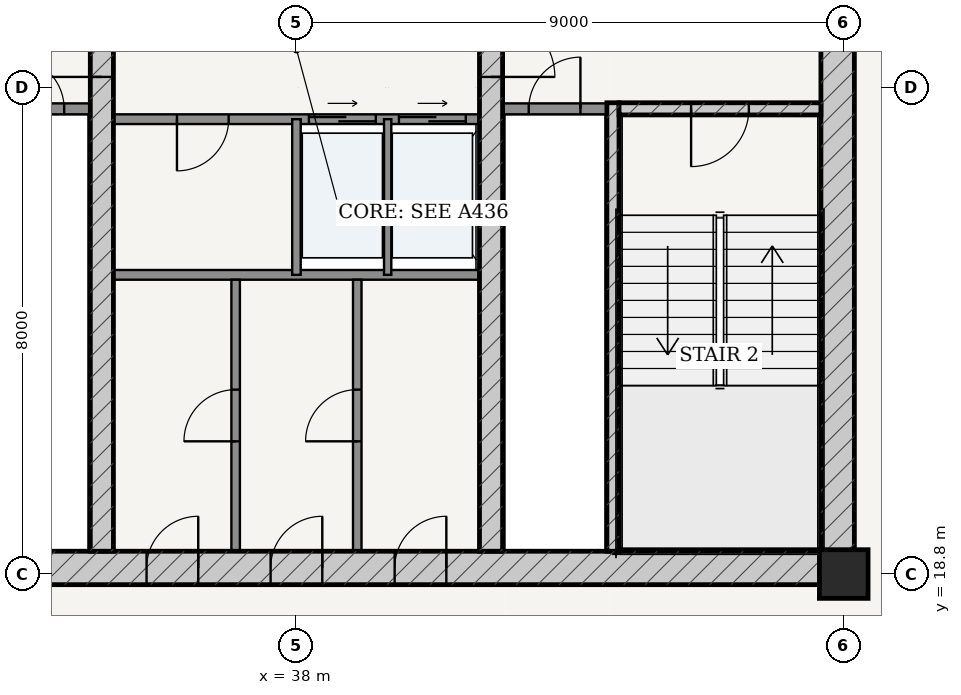
"""IFC4 building model, lengths in metres.
Left out: names, types, materials, properties, quantities, classifications, styles, units other than length and angle.
Written with IfcOpenShell. Run it as: python <this file> out.ifc"""

import sys

from ifc_helpers import new_model, si_unit, direction, frame, frame_2d, origin, origin_2d, place, context, subcontext, project, spatial, rectangle, extrude, source, transform, mapped, element, fill, save


model = new_model("IFC4")
c1 = context("Model", 3, precision=1e-05, world=origin(), true_north=direction((-0.2419218956, 0.970295726276)))
c2 = subcontext(c1, "Body", "Model", "MODEL_VIEW")
j1 = project(units=[si_unit("LENGTHUNIT", "METRE"), si_unit("PLANEANGLEUNIT", "RADIAN")], contexts=[c1])
p1 = place(None, origin())
s1 = spatial("IfcSite", under=j1, at=p1, CompositionType="ELEMENT")
p2 = place(p1, origin())
s2 = spatial("IfcBuilding", under=s1, at=p2, CompositionType="ELEMENT")
p3 = place(p2, frame((0.0, 0.0, 278.2)))
s3 = spatial("IfcBuildingStorey", under=s2, at=p3, CompositionType="ELEMENT", Elevation=278.2)
p4 = place(p3, frame((47.0, 18.8, 0.0), z_axis=(0.0, 0.0, 1.0), x_axis=(1.0, 0.0, 0.0)))
e1 = element("IfcColumn", 1, at=p4, inside=s3, PredefinedType="COLUMN", context=c2, shape_type="SweptSolid", body=[
    extrude(rectangle(XDim=0.8, YDim=0.8, at=origin_2d()), origin(), (0.0, 0.0, 1.0), 3.75),
])
p5 = place(p3, frame((28.825, 18.9, 0.0), z_axis=(0.0, 0.0, 1.0), x_axis=(1.0, 0.0, 0.0)))
e2 = element("IfcWall", 2, at=p5, inside=s3, PredefinedType="SHEAR", context=c2, shape_type="SweptSolid", body=[
    extrude(rectangle(XDim=18.35, YDim=0.55, at=frame_2d((9.175, 0.0))), origin(), (0.0, 0.0, 1.0), 3.49),
])
p6 = place(p5, frame((6.71, 0.0, 0.0)))
e3 = element("IfcOpeningElement", 3, at=p6, cuts=e2, PredefinedType="OPENING", context=c2, shape_type="SweptSolid", body=[
    extrude(rectangle(XDim=0.85, YDim=2.1, at=frame_2d((0.425, 1.05))), frame((0.0, 0.285, 0.0), z_axis=(0.0, -1.0, 0.0), x_axis=(1.0, 0.0, 0.0)), (0.0, 0.0, 1.0), 0.57),
])
p7 = place(p5, frame((8.75, 0.0, 0.0)))
e4 = element("IfcOpeningElement", 4, at=p7, cuts=e2, PredefinedType="OPENING", context=c2, shape_type="SweptSolid", body=[
    extrude(rectangle(XDim=0.85, YDim=2.1, at=frame_2d((0.425, 1.05))), frame((0.0, 0.285, 0.0), z_axis=(0.0, -1.0, 0.0), x_axis=(1.0, 0.0, 0.0)), (0.0, 0.0, 1.0), 0.57),
])
p8 = place(p5, frame((10.79, 0.0, 0.0)))
e5 = element("IfcOpeningElement", 5, at=p8, cuts=e2, PredefinedType="OPENING", context=c2, shape_type="SweptSolid", body=[
    extrude(rectangle(XDim=0.85, YDim=2.1, at=frame_2d((0.425, 1.05))), frame((0.0, 0.285, 0.0), z_axis=(0.0, -1.0, 0.0), x_axis=(1.0, 0.0, 0.0)), (0.0, 0.0, 1.0), 0.57),
])
p9 = place(p3, frame((46.9, 19.175, 0.0), z_axis=(0.0, 0.0, 1.0), x_axis=(0.0, 1.0, 0.0)))
e6 = element("IfcWall", 6, at=p9, inside=s3, PredefinedType="SHEAR", context=c2, shape_type="SweptSolid", body=[
    extrude(rectangle(XDim=15.25, YDim=0.55, at=frame_2d((7.625, 0.0))), origin(), (0.0, 0.0, 1.0), 3.49),
])
p10 = place(p9, frame((9.875, 0.0, 0.0)))
e7 = element("IfcOpeningElement", 7, at=p10, cuts=e6, PredefinedType="OPENING", context=c2, shape_type="SweptSolid", body=[
    extrude(rectangle(XDim=1.5, YDim=2.2, at=frame_2d((0.75, 1.1))), frame((0.0, 0.285, 0.0), z_axis=(0.0, -1.0, 0.0), x_axis=(1.0, 0.0, 0.0)), (0.0, 0.0, 1.0), 0.57),
])
p11 = place(p3, frame((43.205, 19.175, 0.0), z_axis=(0.0, 0.0, 1.0), x_axis=(0.0, 1.0, 0.0)))
e8 = element("IfcWall", 8, at=p11, inside=s3, PredefinedType="SOLIDWALL", context=c2, shape_type="SweptSolid", body=[
    extrude(rectangle(XDim=7.375, YDim=0.2, at=frame_2d((3.688, 0.0))), origin(), (0.0, 0.0, 1.0), 3.49),
])
p12 = place(p3, frame((43.305, 26.45, 0.0), z_axis=(0.0, 0.0, 1.0), x_axis=(1.0, 0.0, 0.0)))
e9 = element("IfcWall", 9, at=p12, inside=s3, PredefinedType="SOLIDWALL", context=c2, shape_type="SweptSolid", body=[
    extrude(rectangle(XDim=3.32, YDim=0.2, at=frame_2d((1.66, 0.0))), origin(), (0.0, 0.0, 1.0), 3.49),
])
p13 = place(p12, frame((1.185, 0.0, 0.0)))
e10 = element("IfcOpeningElement", 10, at=p13, cuts=e9, PredefinedType="OPENING", context=c2, shape_type="SweptSolid", body=[
    extrude(rectangle(XDim=0.95, YDim=2.15, at=frame_2d((0.475, 1.075))), frame((0.0, 0.11, 0.0), z_axis=(0.0, -1.0, 0.0), x_axis=(1.0, 0.0, 0.0)), (0.0, 0.0, 1.0), 0.22),
])
p14 = place(p3, frame((34.8, 19.175, 0.0), z_axis=(0.0, 0.0, 1.0), x_axis=(0.0, 1.0, 0.0)))
e11 = element("IfcWall", 11, at=p14, inside=s3, PredefinedType="SHEAR", context=c2, shape_type="SweptSolid", body=[
    extrude(rectangle(XDim=15.25, YDim=0.38, at=frame_2d((7.625, 0.0))), origin(), (0.0, 0.0, 1.0), 3.49),
])
p15 = place(p14, frame((7.8, 0.0, 0.0)))
e12 = element("IfcOpeningElement", 12, at=p15, cuts=e11, PredefinedType="OPENING", context=c2, shape_type="SweptSolid", body=[
    extrude(rectangle(XDim=1.05, YDim=2.15, at=frame_2d((0.525, 1.075))), frame((0.0, 0.2, 0.0), z_axis=(0.0, -1.0, 0.0), x_axis=(1.0, 0.0, 0.0)), (0.0, 0.0, 1.0), 0.4),
])
p16 = place(p3, frame((41.2, 19.175, 0.0), z_axis=(0.0, 0.0, 1.0), x_axis=(0.0, 1.0, 0.0)))
e13 = element("IfcWall", 13, at=p16, inside=s3, PredefinedType="SHEAR", context=c2, shape_type="SweptSolid", body=[
    extrude(rectangle(XDim=15.25, YDim=0.38, at=frame_2d((7.625, 0.0))), origin(), (0.0, 0.0, 1.0), 3.49),
])
p17 = place(p16, frame((7.8, 0.0, 0.0)))
e14 = element("IfcOpeningElement", 14, at=p17, cuts=e13, PredefinedType="OPENING", context=c2, shape_type="SweptSolid", body=[
    extrude(rectangle(XDim=1.05, YDim=2.15, at=frame_2d((0.525, 1.075))), frame((0.0, 0.2, 0.0), z_axis=(0.0, -1.0, 0.0), x_axis=(1.0, 0.0, 0.0)), (0.0, 0.0, 1.0), 0.4),
])
p18 = place(p3, frame((32.9, 26.45, 0.0), z_axis=(0.0, 0.0, 1.0), x_axis=(1.0, 0.0, 0.0)))
e15 = element("IfcWall", 15, at=p18, inside=s3, PredefinedType="PARTITIONING", context=c2, shape_type="SweptSolid", body=[
    extrude(rectangle(XDim=1.71, YDim=0.18, at=frame_2d((0.855, 0.0))), origin(), (0.0, 0.0, 1.0), 3.49),
])
p19 = place(p18, frame((0.43, 0.0, 0.0)))
e16 = element("IfcOpeningElement", 16, at=p19, cuts=e15, PredefinedType="OPENING", context=c2, shape_type="SweptSolid", body=[
    extrude(rectangle(XDim=0.85, YDim=2.1, at=frame_2d((0.425, 1.05))), frame((0.0, 0.1, 0.0), z_axis=(0.0, -1.0, 0.0), x_axis=(1.0, 0.0, 0.0)), (0.0, 0.0, 1.0), 0.2),
])
p20 = place(p3, frame((41.39, 26.45, 0.0), z_axis=(0.0, 0.0, 1.0), x_axis=(1.0, 0.0, 0.0)))
e17 = element("IfcWall", 17, at=p20, inside=s3, PredefinedType="PARTITIONING", context=c2, shape_type="SweptSolid", body=[
    extrude(rectangle(XDim=1.71, YDim=0.18, at=frame_2d((0.855, 0.0))), origin(), (0.0, 0.0, 1.0), 3.49),
])
p21 = place(p20, frame((0.43, 0.0, 0.0)))
e18 = element("IfcOpeningElement", 18, at=p21, cuts=e17, PredefinedType="OPENING", context=c2, shape_type="SweptSolid", body=[
    extrude(rectangle(XDim=0.85, YDim=2.1, at=frame_2d((0.425, 1.05))), frame((0.0, 0.1, 0.0), z_axis=(0.0, -1.0, 0.0), x_axis=(1.0, 0.0, 0.0)), (0.0, 0.0, 1.0), 0.2),
])
p22 = place(p3, frame((34.99, 26.28, 0.0), z_axis=(0.0, 0.0, 1.0), x_axis=(1.0, 0.0, 0.0)))
e19 = element("IfcWall", 19, at=p22, inside=s3, PredefinedType="PARTITIONING", context=c2, shape_type="SweptSolid", body=[
    extrude(rectangle(XDim=6.02, YDim=0.16, at=frame_2d((3.01, 0.0))), origin(), (0.0, 0.0, 1.0), 3.49),
])
p23 = place(p22, frame((1.045, 0.0, 0.0)))
e20 = element("IfcOpeningElement", 20, at=p23, cuts=e19, PredefinedType="OPENING", context=c2, shape_type="SweptSolid", body=[
    extrude(rectangle(XDim=0.85, YDim=2.1, at=frame_2d((0.425, 1.05))), frame((0.0, 0.09, 0.0), z_axis=(0.0, -1.0, 0.0), x_axis=(1.0, 0.0, 0.0)), (0.0, 0.0, 1.0), 0.18),
])
p24 = place(p22, frame((3.215, 0.0, 0.0)))
e21 = element("IfcOpeningElement", 21, at=p24, cuts=e19, PredefinedType="OPENING", context=c2, shape_type="SweptSolid", body=[
    extrude(rectangle(XDim=1.1, YDim=2.2, at=frame_2d((0.55, 1.1))), frame((0.0, 0.09, 0.0), z_axis=(0.0, -1.0, 0.0), x_axis=(1.0, 0.0, 0.0)), (0.0, 0.0, 1.0), 0.18),
])
p25 = place(p22, frame((4.695, 0.0, 0.0)))
e22 = element("IfcOpeningElement", 22, at=p25, cuts=e19, PredefinedType="OPENING", context=c2, shape_type="SweptSolid", body=[
    extrude(rectangle(XDim=1.1, YDim=2.2, at=frame_2d((0.55, 1.1))), frame((0.0, 0.09, 0.0), z_axis=(0.0, -1.0, 0.0), x_axis=(1.0, 0.0, 0.0)), (0.0, 0.0, 1.0), 0.18),
])
p26 = place(p3, frame((34.99, 23.72, 0.0), z_axis=(0.0, 0.0, 1.0), x_axis=(1.0, 0.0, 0.0)))
e23 = element("IfcWall", 23, at=p26, inside=s3, PredefinedType="PARTITIONING", context=c2, shape_type="SweptSolid", body=[
    extrude(rectangle(XDim=6.02, YDim=0.16, at=frame_2d((3.01, 0.0))), origin(), (0.0, 0.0, 1.0), 3.49),
])
p27 = place(p3, frame((38.0, 23.72, 0.0), z_axis=(0.0, 0.0, 1.0), x_axis=(0.0, 1.0, 0.0)))
e24 = element("IfcWall", 24, at=p27, inside=s3, PredefinedType="PARTITIONING", context=c2, shape_type="SweptSolid", body=[
    extrude(rectangle(XDim=2.56, YDim=0.14, at=frame_2d((1.28, 0.0))), origin(), (0.0, 0.0, 1.0), 3.49),
])
p28 = place(p3, frame((39.5, 23.72, 0.0), z_axis=(0.0, 0.0, 1.0), x_axis=(0.0, 1.0, 0.0)))
e25 = element("IfcWall", 25, at=p28, inside=s3, PredefinedType="PARTITIONING", context=c2, shape_type="SweptSolid", body=[
    extrude(rectangle(XDim=2.56, YDim=0.12, at=frame_2d((1.28, 0.0))), origin(), (0.0, 0.0, 1.0), 3.49),
])
p29 = place(p3, frame((37.0, 19.175, 0.0), z_axis=(0.0, 0.0, 1.0), x_axis=(0.0, 1.0, 0.0)))
e26 = element("IfcWall", 26, at=p29, inside=s3, PredefinedType="PARTITIONING", context=c2, shape_type="SweptSolid", body=[
    extrude(rectangle(XDim=4.465, YDim=0.14, at=frame_2d((2.232, 0.0))), origin(), (0.0, 0.0, 1.0), 3.49),
])
p30 = place(p29, frame((1.808, 0.0, 0.0)))
e27 = element("IfcOpeningElement", 27, at=p30, cuts=e26, PredefinedType="OPENING", context=c2, shape_type="SweptSolid", body=[
    extrude(rectangle(XDim=0.85, YDim=2.1, at=frame_2d((0.425, 1.05))), frame((0.0, 0.08, 0.0), z_axis=(0.0, -1.0, 0.0), x_axis=(1.0, 0.0, 0.0)), (0.0, 0.0, 1.0), 0.16),
])
p31 = place(p3, frame((39.0, 19.175, 0.0), z_axis=(0.0, 0.0, 1.0), x_axis=(0.0, 1.0, 0.0)))
e28 = element("IfcWall", 28, at=p31, inside=s3, PredefinedType="PARTITIONING", context=c2, shape_type="SweptSolid", body=[
    extrude(rectangle(XDim=4.465, YDim=0.14, at=frame_2d((2.232, 0.0))), origin(), (0.0, 0.0, 1.0), 3.49),
])
p32 = place(p31, frame((1.808, 0.0, 0.0)))
e29 = element("IfcOpeningElement", 29, at=p32, cuts=e28, PredefinedType="OPENING", context=c2, shape_type="SweptSolid", body=[
    extrude(rectangle(XDim=0.85, YDim=2.1, at=frame_2d((0.425, 1.05))), frame((0.0, 0.08, 0.0), z_axis=(0.0, -1.0, 0.0), x_axis=(1.0, 0.0, 0.0)), (0.0, 0.0, 1.0), 0.16),
])
m1 = source(origin(), c2, "Body", "SweptSolid", [
    extrude(rectangle(XDim=1.05, YDim=2.15, at=frame_2d((0.525, 1.075))), frame((0.0, 0.025, 0.0), z_axis=(0.0, -1.0, 0.0), x_axis=(1.0, 0.0, 0.0)), (0.0, 0.0, 1.0), 0.05),
])
p33 = place(p15, origin())
e30 = element("IfcDoor", 30, at=p33, inside=s3, OperationType="SINGLE_SWING_LEFT", PredefinedType="DOOR", context=c2, shape_type="MappedRepresentation", body=[
    mapped(m1, transform((0.0, 0.0, 0.0), scale=1.0)),
])
fill(e12, e30)
p34 = place(p17, frame((1.05, 0.0, 0.0), z_axis=(0.0, 0.0, 1.0), x_axis=(-1.0, 0.0, 0.0)))
e31 = element("IfcDoor", 31, at=p34, inside=s3, OperationType="SINGLE_SWING_RIGHT", PredefinedType="DOOR", context=c2, shape_type="MappedRepresentation", body=[
    mapped(m1, transform((0.0, 0.0, 0.0), scale=1.0)),
])
fill(e14, e31)
m2 = source(origin(), c2, "Body", "SweptSolid", [
    extrude(rectangle(XDim=0.95, YDim=2.15, at=frame_2d((0.475, 1.075))), frame((0.0, 0.025, 0.0), z_axis=(0.0, -1.0, 0.0), x_axis=(1.0, 0.0, 0.0)), (0.0, 0.0, 1.0), 0.05),
])
p35 = place(p13, frame((0.95, 0.0, 0.0), z_axis=(0.0, 0.0, 1.0), x_axis=(-1.0, 0.0, 0.0)))
e32 = element("IfcDoor", 32, at=p35, inside=s3, OperationType="SINGLE_SWING_RIGHT", PredefinedType="DOOR", context=c2, shape_type="MappedRepresentation", body=[
    mapped(m2, transform((0.0, 0.0, 0.0), scale=1.0)),
])
fill(e10, e32)
m3 = source(origin(), c2, "Body", "SweptSolid", [
    extrude(rectangle(XDim=0.85, YDim=2.1, at=frame_2d((0.425, 1.05))), frame((0.0, 0.025, 0.0), z_axis=(0.0, -1.0, 0.0), x_axis=(1.0, 0.0, 0.0)), (0.0, 0.0, 1.0), 0.05),
])
p36 = place(p19, origin())
e33 = element("IfcDoor", 33, at=p36, inside=s3, OperationType="SINGLE_SWING_LEFT", PredefinedType="DOOR", context=c2, shape_type="MappedRepresentation", body=[
    mapped(m3, transform((0.0, 0.0, 0.0), scale=1.0)),
])
fill(e16, e33)
p37 = place(p21, origin())
e34 = element("IfcDoor", 34, at=p37, inside=s3, OperationType="SINGLE_SWING_RIGHT", PredefinedType="DOOR", context=c2, shape_type="MappedRepresentation", body=[
    mapped(m3, transform((0.0, 0.0, 0.0), scale=1.0)),
])
fill(e18, e34)
p38 = place(p23, frame((0.85, 0.0, 0.0), z_axis=(0.0, 0.0, 1.0), x_axis=(-1.0, 0.0, 0.0)))
e35 = element("IfcDoor", 35, at=p38, inside=s3, OperationType="SINGLE_SWING_RIGHT", PredefinedType="DOOR", context=c2, shape_type="MappedRepresentation", body=[
    mapped(m3, transform((0.0, 0.0, 0.0), scale=1.0)),
])
fill(e20, e35)
p39 = place(p6, origin())
e36 = element("IfcDoor", 36, at=p39, inside=s3, OperationType="SINGLE_SWING_RIGHT", PredefinedType="DOOR", context=c2, shape_type="MappedRepresentation", body=[
    mapped(m3, transform((0.0, 0.0, 0.0), scale=1.0)),
])
fill(e3, e36)
p40 = place(p7, origin())
e37 = element("IfcDoor", 37, at=p40, inside=s3, OperationType="SINGLE_SWING_RIGHT", PredefinedType="DOOR", context=c2, shape_type="MappedRepresentation", body=[
    mapped(m3, transform((0.0, 0.0, 0.0), scale=1.0)),
])
fill(e4, e37)
p41 = place(p8, origin())
e38 = element("IfcDoor", 38, at=p41, inside=s3, OperationType="SINGLE_SWING_RIGHT", PredefinedType="DOOR", context=c2, shape_type="MappedRepresentation", body=[
    mapped(m3, transform((0.0, 0.0, 0.0), scale=1.0)),
])
fill(e5, e38)
p42 = place(p30, origin())
e39 = element("IfcDoor", 39, at=p42, inside=s3, OperationType="SINGLE_SWING_LEFT", PredefinedType="DOOR", context=c2, shape_type="MappedRepresentation", body=[
    mapped(m3, transform((0.0, 0.0, 0.0), scale=1.0)),
])
fill(e27, e39)
p43 = place(p32, origin())
e40 = element("IfcDoor", 40, at=p43, inside=s3, OperationType="SINGLE_SWING_LEFT", PredefinedType="DOOR", context=c2, shape_type="MappedRepresentation", body=[
    mapped(m3, transform((0.0, 0.0, 0.0), scale=1.0)),
])
fill(e29, e40)
m4 = source(origin(), c2, "Body", "SweptSolid", [
    extrude(rectangle(XDim=1.1, YDim=2.2, at=frame_2d((0.55, 1.1))), frame((0.0, 0.025, 0.0), z_axis=(0.0, -1.0, 0.0), x_axis=(1.0, 0.0, 0.0)), (0.0, 0.0, 1.0), 0.05),
])
p44 = place(p24, origin())
e41 = element("IfcDoor", 41, at=p44, inside=s3, OperationType="DOUBLE_DOOR_SLIDING", PredefinedType="DOOR", context=c2, shape_type="MappedRepresentation", body=[
    mapped(m4, transform((0.0, 0.0, 0.0), scale=1.0)),
])
fill(e21, e41)
p45 = place(p25, origin())
e42 = element("IfcDoor", 42, at=p45, inside=s3, OperationType="DOUBLE_DOOR_SLIDING", PredefinedType="DOOR", context=c2, shape_type="MappedRepresentation", body=[
    mapped(m4, transform((0.0, 0.0, 0.0), scale=1.0)),
])
fill(e22, e42)
save(model, sys.argv[1])
